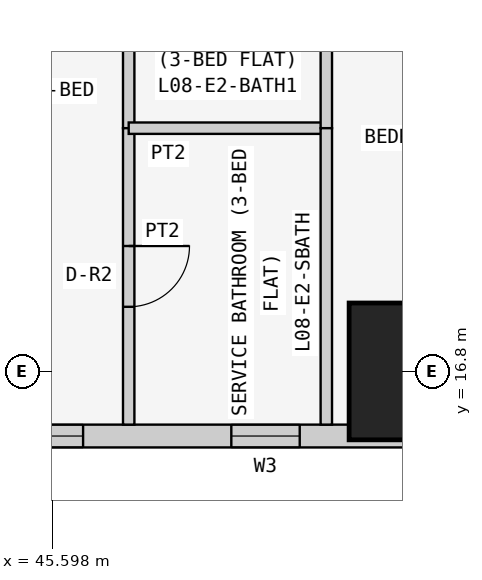
"""IFC4 building model, lengths in metres.
Left out: names, types, materials, properties, quantities, classifications, styles, units other than length and angle.
Written with IfcOpenShell. Run it as: python <this file> out.ifc"""

import sys

from ifc_helpers import new_model, si_unit, direction, frame, frame_2d, origin, origin_2d, place, context, subcontext, project, spatial, rectangle, extrude, element, fill, save


model = new_model("IFC4")
c1 = context("Model", 3, precision=1e-05, world=origin(), true_north=direction((0.0, 1.0)))
c2 = subcontext(c1, "Body", "Model", "MODEL_VIEW")
j1 = project(units=[si_unit("LENGTHUNIT", "METRE"), si_unit("PLANEANGLEUNIT", "RADIAN")], contexts=[c1])
p1 = place(None, origin())
s1 = spatial("IfcSite", under=j1, at=p1, CompositionType="ELEMENT")
p2 = place(p1, origin())
s2 = spatial("IfcBuilding", under=s1, at=p2, CompositionType="ELEMENT")
p3 = place(p2, frame((0.0, 0.0, 38.1)))
s3 = spatial("IfcBuildingStorey", under=s2, at=p3, CompositionType="ELEMENT", Elevation=38.1)
p4 = place(p3, frame((50.4, 16.8, 0.0), z_axis=(0.0, 0.0, 1.0), x_axis=(1.0, 0.0, 0.0)))
e1 = element("IfcColumn", 1, at=p4, inside=s3, PredefinedType="COLUMN", context=c2, shape_type="SweptSolid", body=[
    extrude(rectangle(XDim=1.8, YDim=1.8, at=origin_2d()), origin(), (0.0, 0.0, 1.0), 3.6),
])
p5 = place(p3, frame((43.0, 15.95, 0.0), z_axis=(0.0, 0.0, 1.0), x_axis=(1.0, 0.0, 0.0)))
e2 = element("IfcWall", 2, at=p5, inside=s3, PredefinedType="SOLIDWALL", context=c2, shape_type="SweptSolid", body=[
    extrude(rectangle(XDim=15.4, YDim=0.3, at=frame_2d((7.7, 0.0))), origin(), (0.0, 0.0, 1.0), 3.45),
])
p6 = place(p5, frame((1.2, 0.0, 0.9)))
e3 = element("IfcOpeningElement", 3, at=p6, cuts=e2, PredefinedType="OPENING", context=c2, shape_type="SweptSolid", body=[
    extrude(rectangle(XDim=1.8, YDim=1.5, at=frame_2d((0.9, 0.75))), frame((0.0, 0.16, 0.0), z_axis=(0.0, -1.0, 0.0), x_axis=(1.0, 0.0, 0.0)), (0.0, 0.0, 1.0), 0.32),
])
p7 = place(p5, frame((4.95, 0.0, 1.5)))
e4 = element("IfcOpeningElement", 4, at=p7, cuts=e2, PredefinedType="OPENING", context=c2, shape_type="SweptSolid", body=[
    extrude(rectangle(XDim=0.9, YDim=0.7, at=frame_2d((0.45, 0.35))), frame((0.0, 0.16, 0.0), z_axis=(0.0, -1.0, 0.0), x_axis=(1.0, 0.0, 0.0)), (0.0, 0.0, 1.0), 0.32),
])
p8 = place(p5, frame((8.5, 0.0, 0.9)))
e5 = element("IfcOpeningElement", 5, at=p8, cuts=e2, PredefinedType="OPENING", context=c2, shape_type="SweptSolid", body=[
    extrude(rectangle(XDim=1.8, YDim=1.5, at=frame_2d((0.9, 0.75))), frame((0.0, 0.16, 0.0), z_axis=(0.0, -1.0, 0.0), x_axis=(1.0, 0.0, 0.0)), (0.0, 0.0, 1.0), 0.32),
])
p9 = place(p5, frame((12.5, 0.0, 0.0)))
e6 = element("IfcOpeningElement", 6, at=p9, cuts=e2, PredefinedType="OPENING", context=c2, shape_type="SweptSolid", body=[
    extrude(rectangle(XDim=0.9, YDim=2.4, at=frame_2d((0.45, 1.2))), frame((0.0, 0.16, 0.0), z_axis=(0.0, -1.0, 0.0), x_axis=(1.0, 0.0, 0.0)), (0.0, 0.0, 1.0), 0.32),
])
p10 = place(p5, frame((13.5, 0.0, 0.9)))
e7 = element("IfcOpeningElement", 7, at=p10, cuts=e2, PredefinedType="OPENING", context=c2, shape_type="SweptSolid", body=[
    extrude(rectangle(XDim=1.2, YDim=1.5, at=frame_2d((0.6, 0.75))), frame((0.0, 0.16, 0.0), z_axis=(0.0, -1.0, 0.0), x_axis=(1.0, 0.0, 0.0)), (0.0, 0.0, 1.0), 0.32),
])
p11 = place(p3, frame((46.6, 22.971, 0.0), z_axis=(0.0, 0.0, 1.0), x_axis=(0.0, -1.0, 0.0)))
e8 = element("IfcWall", 8, at=p11, inside=s3, PredefinedType="PARTITIONING", context=c2, shape_type="SweptSolid", body=[
    extrude(rectangle(XDim=2.971, YDim=0.15, at=frame_2d((1.485, 0.0))), origin(), (0.0, 0.0, 1.0), 3.45),
])
p12 = place(p3, frame((46.6, 20.0, 0.0), z_axis=(0.0, 0.0, 1.0), x_axis=(0.0, -1.0, 0.0)))
e9 = element("IfcWall", 9, at=p12, inside=s3, PredefinedType="PARTITIONING", context=c2, shape_type="SweptSolid", body=[
    extrude(rectangle(XDim=3.9, YDim=0.15, at=frame_2d((1.95, 0.0))), origin(), (0.0, 0.0, 1.0), 3.45),
])
p13 = place(p12, frame((1.55, 0.0, 0.0)))
e10 = element("IfcOpeningElement", 10, at=p13, cuts=e9, PredefinedType="OPENING", context=c2, shape_type="SweptSolid", body=[
    extrude(rectangle(XDim=0.8, YDim=2.1, at=frame_2d((0.4, 1.05))), frame((0.0, 0.085, 0.0), z_axis=(0.0, -1.0, 0.0), x_axis=(1.0, 0.0, 0.0)), (0.0, 0.0, 1.0), 0.17),
])
p14 = place(p3, frame((49.2, 20.0, 0.0), z_axis=(0.0, 0.0, 1.0), x_axis=(-1.0, 0.0, 0.0)))
e11 = element("IfcWall", 11, at=p14, inside=s3, PredefinedType="PARTITIONING", context=c2, shape_type="SweptSolid", body=[
    extrude(rectangle(XDim=2.6, YDim=0.15, at=frame_2d((1.3, 0.0))), origin(), (0.0, 0.0, 1.0), 3.45),
])
p15 = place(p3, frame((49.2, 22.971, 0.0), z_axis=(0.0, 0.0, 1.0), x_axis=(0.0, -1.0, 0.0)))
e12 = element("IfcWall", 12, at=p15, inside=s3, PredefinedType="PARTITIONING", context=c2, shape_type="SweptSolid", body=[
    extrude(rectangle(XDim=2.971, YDim=0.15, at=frame_2d((1.485, 0.0))), origin(), (0.0, 0.0, 1.0), 3.45),
])
p16 = place(p3, frame((49.2, 20.0, 0.0), z_axis=(0.0, 0.0, 1.0), x_axis=(0.0, -1.0, 0.0)))
e13 = element("IfcWall", 13, at=p16, inside=s3, PredefinedType="PARTITIONING", context=c2, shape_type="SweptSolid", body=[
    extrude(rectangle(XDim=3.9, YDim=0.15, at=frame_2d((1.95, 0.0))), origin(), (0.0, 0.0, 1.0), 3.45),
])
p17 = place(p6, origin())
e14 = element("IfcWindow", 14, at=p17, inside=s3, PartitioningType="SINGLE_PANEL", PredefinedType="WINDOW", context=c2, shape_type="SweptSolid", body=[
    extrude(rectangle(XDim=1.8, YDim=1.5, at=frame_2d((0.9, 0.75))), frame((0.0, 0.03, 0.0), z_axis=(0.0, -1.0, 0.0), x_axis=(1.0, 0.0, 0.0)), (0.0, 0.0, 1.0), 0.06),
])
fill(e3, e14)
p18 = place(p7, origin())
e15 = element("IfcWindow", 15, at=p18, inside=s3, PartitioningType="SINGLE_PANEL", PredefinedType="WINDOW", context=c2, shape_type="SweptSolid", body=[
    extrude(rectangle(XDim=0.9, YDim=0.7, at=frame_2d((0.45, 0.35))), frame((0.0, 0.03, 0.0), z_axis=(0.0, -1.0, 0.0), x_axis=(1.0, 0.0, 0.0)), (0.0, 0.0, 1.0), 0.06),
])
fill(e4, e15)
p19 = place(p13, origin())
e16 = element("IfcDoor", 16, at=p19, inside=s3, OperationType="SINGLE_SWING_LEFT", PredefinedType="DOOR", context=c2, shape_type="SweptSolid", body=[
    extrude(rectangle(XDim=0.8, YDim=2.1, at=frame_2d((0.4, 1.05))), frame((0.0, 0.025, 0.0), z_axis=(0.0, -1.0, 0.0), x_axis=(1.0, 0.0, 0.0)), (0.0, 0.0, 1.0), 0.05),
])
fill(e10, e16)
save(model, sys.argv[1])
